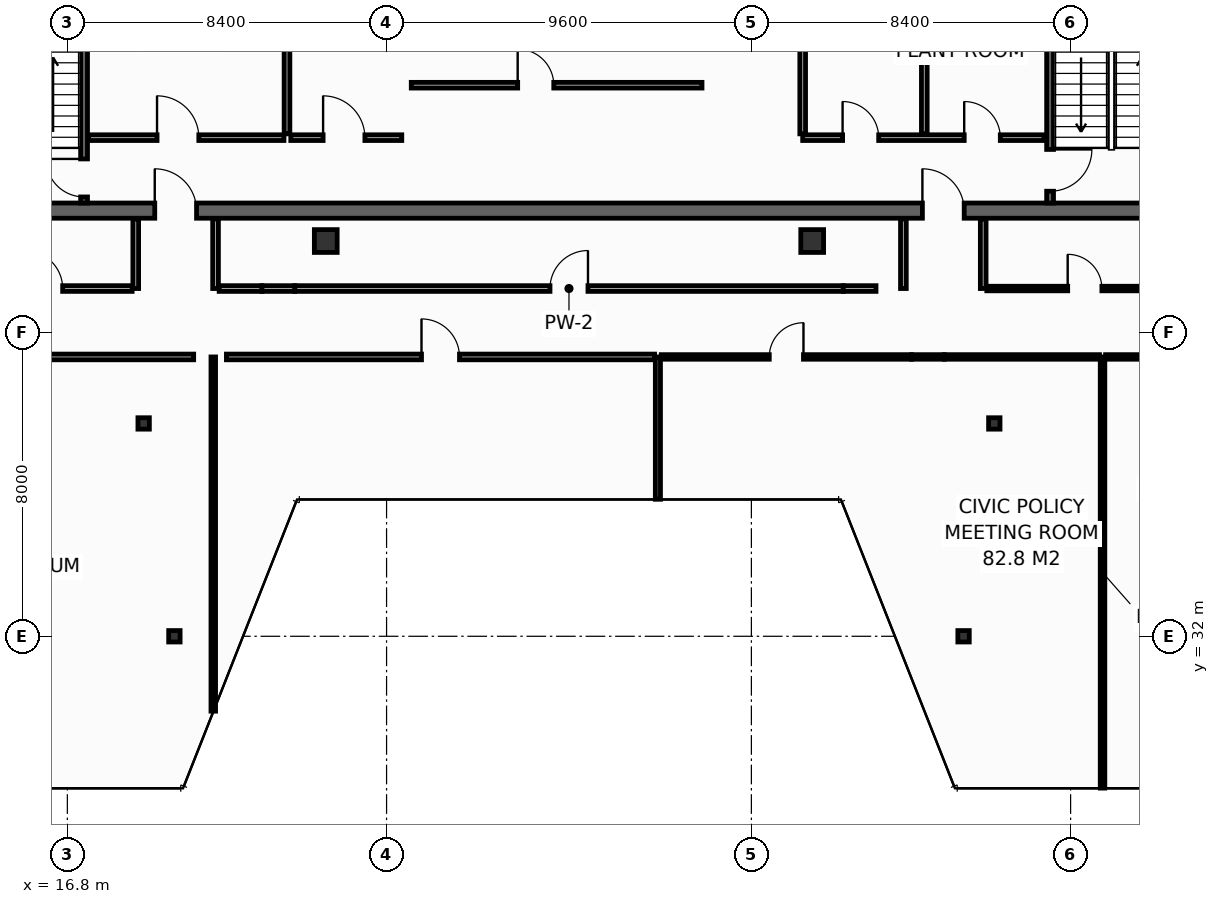
"""IFC4 building model, lengths in metres.
Left out: names, types, materials, properties, quantities, classifications, styles, units other than length and angle.
Written with IfcOpenShell. Run it as: python <this file> out.ifc"""

import sys

from ifc_helpers import new_model, si_unit, direction, frame, frame_2d, origin, origin_2d, place, context, subcontext, project, spatial, rectangle, hollow_rectangle, extrude, element, fill, save


model = new_model("IFC4")
c1 = context("Model", 3, precision=1e-05, world=origin(), true_north=direction((0.0, 1.0)))
c2 = subcontext(c1, "Body", "Model", "MODEL_VIEW")
j1 = project(units=[si_unit("LENGTHUNIT", "METRE"), si_unit("PLANEANGLEUNIT", "RADIAN")], contexts=[c1])
p1 = place(None, origin())
s1 = spatial("IfcSite", under=j1, at=p1, CompositionType="ELEMENT")
p2 = place(p1, origin())
s2 = spatial("IfcBuilding", under=s1, at=p2, CompositionType="ELEMENT")
p3 = place(p2, frame((0.0, 0.0, 291.4)))
s3 = spatial("IfcBuildingStorey", under=s2, at=p3, CompositionType="ELEMENT", Elevation=291.4)
p4 = place(p3, frame((13.7, 43.2, 0.0), z_axis=(0.0, 0.0, 1.0), x_axis=(1.0, 0.0, 0.0)))
e1 = element("IfcWall", 1, at=p4, inside=s3, PredefinedType="SHEAR", context=c2, shape_type="SweptSolid", body=[
    extrude(rectangle(XDim=32.5, YDim=0.4, at=frame_2d((16.25, 0.0))), origin(), (0.0, 0.0, 1.0), 3.55),
])
p5 = place(p4, frame((5.4, 0.0, 0.0)))
e2 = element("IfcOpeningElement", 2, at=p5, cuts=e1, PredefinedType="OPENING", context=c2, shape_type="SweptSolid", body=[
    extrude(rectangle(XDim=1.1, YDim=2.15, at=frame_2d((0.55, 1.075))), frame((0.0, 0.21, 0.0), z_axis=(0.0, -1.0, 0.0), x_axis=(1.0, 0.0, 0.0)), (0.0, 0.0, 1.0), 0.42),
])
p6 = place(p4, frame((25.6, 0.0, 0.0)))
e3 = element("IfcOpeningElement", 3, at=p6, cuts=e1, PredefinedType="OPENING", context=c2, shape_type="SweptSolid", body=[
    extrude(rectangle(XDim=1.1, YDim=2.15, at=frame_2d((0.55, 1.075))), frame((0.0, 0.21, 0.0), z_axis=(0.0, -1.0, 0.0), x_axis=(1.0, 0.0, 0.0)), (0.0, 0.0, 1.0), 0.42),
])
for number, where, z_axis, x_axis in (
    (4, (23.6, 42.4, 0.0), (0.0, 0.0, 1.0), (1.0, 0.0, 0.0)),
    (5, (36.4, 42.4, 0.0), (0.0, 0.0, 1.0), (1.0, 0.0, 0.0)),
):
    element("IfcColumn", number, at=place(p3, frame(where, z_axis=z_axis, x_axis=x_axis)), inside=s3, PredefinedType="COLUMN", context=c2, shape_type="SweptSolid", body=[
        extrude(hollow_rectangle(XDim=0.6, YDim=0.6, WallThickness=0.028, at=origin_2d()), origin(), (0.0, 0.0, 1.0), 3.8),
    ])
for number, where, z_axis, x_axis in (
    (6, (19.617, 32.0, 0.0), (0.0, 0.0, 1.0), (1.0, 0.0, 0.0)),
    (7, (40.383, 32.0, 0.0), (0.0, 0.0, 1.0), (1.0, 0.0, 0.0)),
    (8, (18.808, 37.6, 0.0), (0.0, 0.0, 1.0), (1.0, 0.0, 0.0)),
    (9, (41.192, 37.6, 0.0), (0.0, 0.0, 1.0), (1.0, 0.0, 0.0)),
):
    element("IfcColumn", number, at=place(p3, frame(where, z_axis=z_axis, x_axis=x_axis)), inside=s3, PredefinedType="COLUMN", context=c2, shape_type="SweptSolid", body=[
        extrude(hollow_rectangle(XDim=0.3, YDim=0.3, WallThickness=0.012, at=origin_2d()), origin(), (0.0, 0.0, 1.0), 3.8),
    ])
p7 = place(p3, frame((17.24, 43.4, 0.0), z_axis=(0.0, 0.0, 1.0), x_axis=(0.0, 1.0, 0.0)))
e10 = element("IfcWall", 10, at=p7, inside=s3, PredefinedType="SHEAR", context=c2, shape_type="SweptSolid", body=[
    extrude(rectangle(XDim=10.4, YDim=0.18, at=frame_2d((5.2, 0.0))), origin(), (0.0, 0.0, 1.0), 3.55),
])
p8 = place(p7, frame((0.16, 0.0, 0.0)))
e11 = element("IfcOpeningElement", 11, at=p8, cuts=e10, PredefinedType="OPENING", context=c2, shape_type="SweptSolid", body=[
    extrude(rectangle(XDim=1.0, YDim=2.15, at=frame_2d((0.5, 1.075))), frame((0.0, 0.1, 0.0), z_axis=(0.0, -1.0, 0.0), x_axis=(1.0, 0.0, 0.0)), (0.0, 0.0, 1.0), 0.2),
])
p9 = place(p3, frame((42.66, 53.8, 0.0), z_axis=(0.0, 0.0, 1.0), x_axis=(0.0, -1.0, 0.0)))
e12 = element("IfcWall", 12, at=p9, inside=s3, PredefinedType="SHEAR", context=c2, shape_type="SweptSolid", body=[
    extrude(rectangle(XDim=10.4, YDim=0.18, at=frame_2d((5.2, 0.0))), origin(), (0.0, 0.0, 1.0), 3.55),
])
p10 = place(p9, frame((8.99, 0.0, 0.0)))
e13 = element("IfcOpeningElement", 13, at=p10, cuts=e12, PredefinedType="OPENING", context=c2, shape_type="SweptSolid", body=[
    extrude(rectangle(XDim=1.1, YDim=2.15, at=frame_2d((0.55, 1.075))), frame((0.0, 0.1, 0.0), z_axis=(0.0, -1.0, 0.0), x_axis=(1.0, 0.0, 0.0)), (0.0, 0.0, 1.0), 0.2),
])
p11 = place(p3, frame((17.36, 45.12, 0.0), z_axis=(0.0, 0.0, 1.0), x_axis=(1.0, 0.0, 0.0)))
e14 = element("IfcWall", 14, at=p11, inside=s3, PredefinedType="PARTITIONING", context=c2, shape_type="SweptSolid", body=[
    extrude(rectangle(XDim=5.14, YDim=0.15, at=frame_2d((2.57, 0.0))), origin(), (0.0, 0.0, 1.0), 3.55),
])
p12 = place(p11, frame((1.8, 0.0, 0.0)))
e15 = element("IfcOpeningElement", 15, at=p12, cuts=e14, PredefinedType="OPENING", context=c2, shape_type="SweptSolid", body=[
    extrude(rectangle(XDim=1.1, YDim=2.15, at=frame_2d((0.55, 1.075))), frame((0.0, 0.085, 0.0), z_axis=(0.0, -1.0, 0.0), x_axis=(1.0, 0.0, 0.0)), (0.0, 0.0, 1.0), 0.17),
])
p13 = place(p3, frame((22.58, 50.55, 0.0), z_axis=(0.0, 0.0, 1.0), x_axis=(0.0, -1.0, 0.0)))
e16 = element("IfcWall", 16, at=p13, inside=s3, PredefinedType="PARTITIONING", context=c2, shape_type="SweptSolid", body=[
    extrude(rectangle(XDim=5.33, YDim=0.15, at=frame_2d((2.665, 0.0))), origin(), (0.0, 0.0, 1.0), 3.55),
])
p14 = place(p13, frame((1.8, 0.0, 0.0)))
e17 = element("IfcOpeningElement", 17, at=p14, cuts=e16, PredefinedType="OPENING", context=c2, shape_type="SweptSolid", body=[
    extrude(rectangle(XDim=1.1, YDim=2.15, at=frame_2d((0.55, 1.075))), frame((0.0, 0.085, 0.0), z_axis=(0.0, -1.0, 0.0), x_axis=(1.0, 0.0, 0.0)), (0.0, 0.0, 1.0), 0.17),
])
p15 = place(p3, frame((22.68, 45.12, 0.0), z_axis=(0.0, 0.0, 1.0), x_axis=(1.0, 0.0, 0.0)))
e18 = element("IfcWall", 18, at=p15, inside=s3, PredefinedType="PARTITIONING", context=c2, shape_type="SweptSolid", body=[
    extrude(rectangle(XDim=2.92, YDim=0.15, at=frame_2d((1.46, 0.0))), origin(), (0.0, 0.0, 1.0), 3.55),
])
p16 = place(p15, frame((0.85, 0.0, 0.0)))
e19 = element("IfcOpeningElement", 19, at=p16, cuts=e18, PredefinedType="OPENING", context=c2, shape_type="SweptSolid", body=[
    extrude(rectangle(XDim=1.1, YDim=2.15, at=frame_2d((0.55, 1.075))), frame((0.0, 0.085, 0.0), z_axis=(0.0, -1.0, 0.0), x_axis=(1.0, 0.0, 0.0)), (0.0, 0.0, 1.0), 0.17),
])
p17 = place(p3, frame((36.15, 45.12, 0.0), z_axis=(0.0, 0.0, 1.0), x_axis=(1.0, 0.0, 0.0)))
e20 = element("IfcWall", 20, at=p17, inside=s3, PredefinedType="PARTITIONING", context=c2, shape_type="SweptSolid", body=[
    extrude(rectangle(XDim=6.35, YDim=0.15, at=frame_2d((3.175, 0.0))), origin(), (0.0, 0.0, 1.0), 3.55),
])
p18 = place(p17, frame((1.05, 0.0, 0.0)))
e21 = element("IfcOpeningElement", 21, at=p18, cuts=e20, PredefinedType="OPENING", context=c2, shape_type="SweptSolid", body=[
    extrude(rectangle(XDim=0.95, YDim=2.15, at=frame_2d((0.475, 1.075))), frame((0.0, 0.085, 0.0), z_axis=(0.0, -1.0, 0.0), x_axis=(1.0, 0.0, 0.0)), (0.0, 0.0, 1.0), 0.17),
])
p19 = place(p17, frame((4.25, 0.0, 0.0)))
e22 = element("IfcOpeningElement", 22, at=p19, cuts=e20, PredefinedType="OPENING", context=c2, shape_type="SweptSolid", body=[
    extrude(rectangle(XDim=0.95, YDim=2.15, at=frame_2d((0.475, 1.075))), frame((0.0, 0.085, 0.0), z_axis=(0.0, -1.0, 0.0), x_axis=(1.0, 0.0, 0.0)), (0.0, 0.0, 1.0), 0.17),
])
for number, where, z_axis, x_axis in (
    (23, (36.15, 45.22, 0.0), (0.0, 0.0, 1.0), (0.0, 1.0, 0.0)),
    (24, (39.35, 45.22, 0.0), (0.0, 0.0, 1.0), (0.0, 1.0, 0.0)),
):
    element("IfcWall", number, at=place(p3, frame(where, z_axis=z_axis, x_axis=x_axis)), inside=s3, PredefinedType="PARTITIONING", context=c2, shape_type="SweptSolid", body=[
        extrude(rectangle(XDim=2.63, YDim=0.15, at=frame_2d((1.315, 0.0))), origin(), (0.0, 0.0, 1.0), 3.55),
    ])
p20 = place(p3, frame((25.85, 46.5, 0.0), z_axis=(0.0, 0.0, 1.0), x_axis=(1.0, 0.0, 0.0)))
e25 = element("IfcWall", 25, at=p20, inside=s3, PredefinedType="PARTITIONING", context=c2, shape_type="SweptSolid", body=[
    extrude(rectangle(XDim=7.65, YDim=0.15, at=frame_2d((3.825, 0.0))), origin(), (0.0, 0.0, 1.0), 3.55),
])
p21 = place(p20, frame((2.8, 0.0, 0.0)))
e26 = element("IfcOpeningElement", 26, at=p21, cuts=e25, PredefinedType="OPENING", context=c2, shape_type="SweptSolid", body=[
    extrude(rectangle(XDim=0.95, YDim=2.15, at=frame_2d((0.475, 1.075))), frame((0.0, 0.085, 0.0), z_axis=(0.0, -1.0, 0.0), x_axis=(1.0, 0.0, 0.0)), (0.0, 0.0, 1.0), 0.17),
])
for number, where, z_axis, x_axis in (
    (27, (18.6, 41.15, 0.0), (0.0, 0.0, 1.0), (0.0, 1.0, 0.0)),
    (28, (20.7, 41.15, 0.0), (0.0, 0.0, 1.0), (0.0, 1.0, 0.0)),
    (29, (38.8, 41.15, 0.0), (0.0, 0.0, 1.0), (0.0, 1.0, 0.0)),
    (30, (40.9, 41.15, 0.0), (0.0, 0.0, 1.0), (0.0, 1.0, 0.0)),
):
    element("IfcWall", number, at=place(p3, frame(where, z_axis=z_axis, x_axis=x_axis)), inside=s3, PredefinedType="PARTITIONING", context=c2, shape_type="SweptSolid", body=[
        extrude(rectangle(XDim=1.83, YDim=0.15, at=frame_2d((0.915, 0.0))), origin(), (0.0, 0.0, 1.0), 3.55),
    ])
p22 = place(p3, frame((13.85, 41.15, 0.0), z_axis=(0.0, 0.0, 1.0), x_axis=(1.0, 0.0, 0.0)))
e31 = element("IfcWall", 31, at=p22, inside=s3, PredefinedType="PARTITIONING", context=c2, shape_type="SweptSolid", body=[
    extrude(rectangle(XDim=4.655, YDim=0.15, at=frame_2d((2.327, 0.0))), origin(), (0.0, 0.0, 1.0), 3.55),
])
p23 = place(p22, frame((1.827, 0.0, 0.0)))
e32 = element("IfcOpeningElement", 32, at=p23, cuts=e31, PredefinedType="OPENING", context=c2, shape_type="SweptSolid", body=[
    extrude(rectangle(XDim=1.0, YDim=2.15, at=frame_2d((0.5, 1.075))), frame((0.0, 0.085, 0.0), z_axis=(0.0, -1.0, 0.0), x_axis=(1.0, 0.0, 0.0)), (0.0, 0.0, 1.0), 0.17),
])
p24 = place(p3, frame((22.783, 41.15, 0.0), z_axis=(0.0, 0.0, 1.0), x_axis=(1.0, 0.0, 0.0)))
e33 = element("IfcWall", 33, at=p24, inside=s3, PredefinedType="PARTITIONING", context=c2, shape_type="SweptSolid", body=[
    extrude(rectangle(XDim=14.434, YDim=0.15, at=frame_2d((7.217, 0.0))), origin(), (0.0, 0.0, 1.0), 3.55),
])
p25 = place(p24, frame((6.717, 0.0, 0.0)))
e34 = element("IfcOpeningElement", 34, at=p25, cuts=e33, PredefinedType="OPENING", context=c2, shape_type="SweptSolid", body=[
    extrude(rectangle(XDim=1.0, YDim=2.15, at=frame_2d((0.5, 1.075))), frame((0.0, 0.085, 0.0), z_axis=(0.0, -1.0, 0.0), x_axis=(1.0, 0.0, 0.0)), (0.0, 0.0, 1.0), 0.17),
])
p26 = place(p3, frame((20.795, 41.15, 0.0), z_axis=(0.0, 0.0, 1.0), x_axis=(1.0, 0.0, 0.0)))
e35 = element("IfcWall", 35, at=p26, inside=s3, PredefinedType="PARTITIONING", context=c2, shape_type="SweptSolid", body=[
    extrude(rectangle(XDim=1.126, YDim=0.15, at=frame_2d((0.563, 0.0))), origin(), (0.0, 0.0, 1.0), 3.55),
])
for number, where, z_axis, x_axis in (
    (36, (21.921, 41.15, 0.0), (0.0, 0.0, 1.0), (1.0, 0.0, 0.0)),
    (37, (37.217, 41.15, 0.0), (0.0, 0.0, 1.0), (1.0, 0.0, 0.0)),
):
    element("IfcWall", number, at=place(p3, frame(where, z_axis=z_axis, x_axis=x_axis)), inside=s3, PredefinedType="PARTITIONING", context=c2, shape_type="SweptSolid", body=[
        extrude(rectangle(XDim=0.862, YDim=0.15, at=frame_2d((0.431, 0.0))), origin(), (0.0, 0.0, 1.0), 2.135),
    ])
p27 = place(p3, frame((40.995, 41.15, 0.0), z_axis=(0.0, 0.0, 1.0), x_axis=(1.0, 0.0, 0.0)))
e38 = element("IfcWall", 38, at=p27, inside=s3, PredefinedType="PARTITIONING", context=c2, shape_type="SweptSolid", body=[
    extrude(rectangle(XDim=5.155, YDim=0.12, at=frame_2d((2.577, 0.0))), origin(), (0.0, 0.0, 1.0), 3.55),
])
p28 = place(p27, frame((2.128, 0.0, 0.0)))
e39 = element("IfcOpeningElement", 39, at=p28, cuts=e38, PredefinedType="OPENING", context=c2, shape_type="SweptSolid", body=[
    extrude(rectangle(XDim=0.9, YDim=2.1, at=frame_2d((0.45, 1.05))), frame((0.0, 0.07, 0.0), z_axis=(0.0, -1.0, 0.0), x_axis=(1.0, 0.0, 0.0)), (0.0, 0.0, 1.0), 0.14),
])
p29 = place(p3, frame((20.64, 30.029, 0.0), z_axis=(0.0, 0.0, 1.0), x_axis=(0.0, 1.0, 0.0)))
e40 = element("IfcWall", 40, at=p29, inside=s3, PredefinedType="PARTITIONING", context=c2, shape_type="SweptSolid", body=[
    extrude(rectangle(XDim=9.321, YDim=0.12, at=frame_2d((4.661, 0.0))), origin(), (0.0, 0.0, 1.0), 2.135),
])
p30 = place(p3, frame((32.34, 35.605, 0.0), z_axis=(0.0, 0.0, 1.0), x_axis=(0.0, 1.0, 0.0)))
e41 = element("IfcWall", 41, at=p30, inside=s3, PredefinedType="PARTITIONING", context=c2, shape_type="SweptSolid", body=[
    extrude(rectangle(XDim=3.745, YDim=0.135, at=frame_2d((1.873, 0.0))), origin(), (0.0, 0.0, 1.0), 2.135),
])
p31 = place(p3, frame((44.04, 28.005, 0.0), z_axis=(0.0, 0.0, 1.0), x_axis=(0.0, 1.0, 0.0)))
e42 = element("IfcWall", 42, at=p31, inside=s3, PredefinedType="PARTITIONING", context=c2, shape_type="SweptSolid", body=[
    extrude(rectangle(XDim=11.345, YDim=0.12, at=frame_2d((5.673, 0.0))), origin(), (0.0, 0.0, 1.0), 1.735),
])
p32 = place(p3, frame((6.523, 39.35, 0.0), z_axis=(0.0, 0.0, 1.0), x_axis=(1.0, 0.0, 0.0)))
e43 = element("IfcWall", 43, at=p32, inside=s3, PredefinedType="PARTITIONING", context=c2, shape_type="SweptSolid", body=[
    extrude(rectangle(XDim=13.601, YDim=0.15, at=frame_2d((6.8, 0.0))), origin(), (0.0, 0.0, 1.0), 3.085),
])
p33 = place(p32, frame((6.3, 0.0, 0.0)))
e44 = element("IfcOpeningElement", 44, at=p33, cuts=e43, PredefinedType="OPENING", context=c2, shape_type="SweptSolid", body=[
    extrude(rectangle(XDim=1.0, YDim=2.15, at=frame_2d((0.5, 1.075))), frame((0.0, 0.085, 0.0), z_axis=(0.0, -1.0, 0.0), x_axis=(1.0, 0.0, 0.0)), (0.0, 0.0, 1.0), 0.17),
])
p34 = place(p3, frame((20.986, 39.35, 0.0), z_axis=(0.0, 0.0, 1.0), x_axis=(1.0, 0.0, 0.0)))
e45 = element("IfcWall", 45, at=p34, inside=s3, PredefinedType="PARTITIONING", context=c2, shape_type="SweptSolid", body=[
    extrude(rectangle(XDim=11.266, YDim=0.15, at=frame_2d((5.633, 0.0))), origin(), (0.0, 0.0, 1.0), 3.55),
])
p35 = place(p34, frame((5.133, 0.0, 0.0)))
e46 = element("IfcOpeningElement", 46, at=p35, cuts=e45, PredefinedType="OPENING", context=c2, shape_type="SweptSolid", body=[
    extrude(rectangle(XDim=1.0, YDim=2.15, at=frame_2d((0.5, 1.075))), frame((0.0, 0.085, 0.0), z_axis=(0.0, -1.0, 0.0), x_axis=(1.0, 0.0, 0.0)), (0.0, 0.0, 1.0), 0.17),
])
p36 = place(p3, frame((32.427, 39.35, 0.0), z_axis=(0.0, 0.0, 1.0), x_axis=(1.0, 0.0, 0.0)))
e47 = element("IfcWall", 47, at=p36, inside=s3, PredefinedType="PARTITIONING", context=c2, shape_type="SweptSolid", body=[
    extrude(rectangle(XDim=6.586, YDim=0.12, at=frame_2d((3.293, 0.0))), origin(), (0.0, 0.0, 1.0), 3.55),
])
p37 = place(p36, frame((2.843, 0.0, 0.0)))
e48 = element("IfcOpeningElement", 48, at=p37, cuts=e47, PredefinedType="OPENING", context=c2, shape_type="SweptSolid", body=[
    extrude(rectangle(XDim=0.9, YDim=2.1, at=frame_2d((0.45, 1.05))), frame((0.0, 0.07, 0.0), z_axis=(0.0, -1.0, 0.0), x_axis=(1.0, 0.0, 0.0)), (0.0, 0.0, 1.0), 0.14),
])
p38 = place(p3, frame((39.876, 39.35, 0.0), z_axis=(0.0, 0.0, 1.0), x_axis=(1.0, 0.0, 0.0)))
e49 = element("IfcWall", 49, at=p38, inside=s3, PredefinedType="PARTITIONING", context=c2, shape_type="SweptSolid", body=[
    extrude(rectangle(XDim=4.084, YDim=0.12, at=frame_2d((2.042, 0.0))), origin(), (0.0, 0.0, 1.0), 3.55),
])
p39 = place(p3, frame((39.014, 39.35, 0.0), z_axis=(0.0, 0.0, 1.0), x_axis=(1.0, 0.0, 0.0)))
e50 = element("IfcWall", 50, at=p39, inside=s3, PredefinedType="PARTITIONING", context=c2, shape_type="SweptSolid", body=[
    extrude(rectangle(XDim=0.862, YDim=0.12, at=frame_2d((0.431, 0.0))), origin(), (0.0, 0.0, 1.0), 2.135),
])
p40 = place(p3, frame((44.12, 39.35, 0.0), z_axis=(0.0, 0.0, 1.0), x_axis=(1.0, 0.0, 0.0)))
e51 = element("IfcWall", 51, at=p40, inside=s3, PredefinedType="PARTITIONING", context=c2, shape_type="SweptSolid", body=[
    extrude(rectangle(XDim=9.356, YDim=0.12, at=frame_2d((4.678, 0.0))), origin(), (0.0, 0.0, 1.0), 3.085),
])
p41 = place(p40, frame((4.228, 0.0, 0.0)))
e52 = element("IfcOpeningElement", 52, at=p41, cuts=e51, PredefinedType="OPENING", context=c2, shape_type="SweptSolid", body=[
    extrude(rectangle(XDim=0.9, YDim=2.1, at=frame_2d((0.45, 1.05))), frame((0.0, 0.07, 0.0), z_axis=(0.0, -1.0, 0.0), x_axis=(1.0, 0.0, 0.0)), (0.0, 0.0, 1.0), 0.14),
])
p42 = place(p8, origin())
e53 = element("IfcDoor", 53, at=p42, inside=s3, OperationType="SINGLE_SWING_RIGHT", PredefinedType="DOOR", context=c2, shape_type="SweptSolid", body=[
    extrude(rectangle(XDim=1.0, YDim=2.15, at=frame_2d((0.5, 1.075))), frame((0.0, 0.025, 0.0), z_axis=(0.0, -1.0, 0.0), x_axis=(1.0, 0.0, 0.0)), (0.0, 0.0, 1.0), 0.05),
])
fill(e11, e53)
p43 = place(p10, origin())
e54 = element("IfcDoor", 54, at=p43, inside=s3, OperationType="SINGLE_SWING_LEFT", PredefinedType="DOOR", context=c2, shape_type="SweptSolid", body=[
    extrude(rectangle(XDim=1.1, YDim=2.15, at=frame_2d((0.55, 1.075))), frame((0.0, 0.025, 0.0), z_axis=(0.0, -1.0, 0.0), x_axis=(1.0, 0.0, 0.0)), (0.0, 0.0, 1.0), 0.05),
])
fill(e13, e54)
p44 = place(p12, origin())
e55 = element("IfcDoor", 55, at=p44, inside=s3, OperationType="SINGLE_SWING_LEFT", PredefinedType="DOOR", context=c2, shape_type="SweptSolid", body=[
    extrude(rectangle(XDim=1.1, YDim=2.15, at=frame_2d((0.55, 1.075))), frame((0.0, 0.025, 0.0), z_axis=(0.0, -1.0, 0.0), x_axis=(1.0, 0.0, 0.0)), (0.0, 0.0, 1.0), 0.05),
])
fill(e15, e55)
p45 = place(p16, origin())
e56 = element("IfcDoor", 56, at=p45, inside=s3, OperationType="SINGLE_SWING_LEFT", PredefinedType="DOOR", context=c2, shape_type="SweptSolid", body=[
    extrude(rectangle(XDim=1.1, YDim=2.15, at=frame_2d((0.55, 1.075))), frame((0.0, 0.025, 0.0), z_axis=(0.0, -1.0, 0.0), x_axis=(1.0, 0.0, 0.0)), (0.0, 0.0, 1.0), 0.05),
])
fill(e19, e56)
p46 = place(p5, origin())
e57 = element("IfcDoor", 57, at=p46, inside=s3, OperationType="SINGLE_SWING_LEFT", PredefinedType="DOOR", context=c2, shape_type="SweptSolid", body=[
    extrude(rectangle(XDim=1.1, YDim=2.15, at=frame_2d((0.55, 1.075))), frame((0.0, 0.025, 0.0), z_axis=(0.0, -1.0, 0.0), x_axis=(1.0, 0.0, 0.0)), (0.0, 0.0, 1.0), 0.05),
])
fill(e2, e57)
p47 = place(p6, origin())
e58 = element("IfcDoor", 58, at=p47, inside=s3, OperationType="SINGLE_SWING_LEFT", PredefinedType="DOOR", context=c2, shape_type="SweptSolid", body=[
    extrude(rectangle(XDim=1.1, YDim=2.15, at=frame_2d((0.55, 1.075))), frame((0.0, 0.025, 0.0), z_axis=(0.0, -1.0, 0.0), x_axis=(1.0, 0.0, 0.0)), (0.0, 0.0, 1.0), 0.05),
])
fill(e3, e58)
p48 = place(p18, origin())
e59 = element("IfcDoor", 59, at=p48, inside=s3, OperationType="SINGLE_SWING_LEFT", PredefinedType="DOOR", context=c2, shape_type="SweptSolid", body=[
    extrude(rectangle(XDim=0.95, YDim=2.15, at=frame_2d((0.475, 1.075))), frame((0.0, 0.025, 0.0), z_axis=(0.0, -1.0, 0.0), x_axis=(1.0, 0.0, 0.0)), (0.0, 0.0, 1.0), 0.05),
])
fill(e21, e59)
p49 = place(p19, origin())
e60 = element("IfcDoor", 60, at=p49, inside=s3, OperationType="SINGLE_SWING_LEFT", PredefinedType="DOOR", context=c2, shape_type="SweptSolid", body=[
    extrude(rectangle(XDim=0.95, YDim=2.15, at=frame_2d((0.475, 1.075))), frame((0.0, 0.025, 0.0), z_axis=(0.0, -1.0, 0.0), x_axis=(1.0, 0.0, 0.0)), (0.0, 0.0, 1.0), 0.05),
])
fill(e22, e60)
p50 = place(p21, origin())
e61 = element("IfcDoor", 61, at=p50, inside=s3, OperationType="SINGLE_SWING_LEFT", PredefinedType="DOOR", context=c2, shape_type="SweptSolid", body=[
    extrude(rectangle(XDim=0.95, YDim=2.15, at=frame_2d((0.475, 1.075))), frame((0.0, 0.025, 0.0), z_axis=(0.0, -1.0, 0.0), x_axis=(1.0, 0.0, 0.0)), (0.0, 0.0, 1.0), 0.05),
])
fill(e26, e61)
p51 = place(p23, origin())
e62 = element("IfcDoor", 62, at=p51, inside=s3, OperationType="SINGLE_SWING_LEFT", PredefinedType="DOOR", context=c2, shape_type="SweptSolid", body=[
    extrude(rectangle(XDim=1.0, YDim=2.15, at=frame_2d((0.5, 1.075))), frame((0.0, 0.025, 0.0), z_axis=(0.0, -1.0, 0.0), x_axis=(1.0, 0.0, 0.0)), (0.0, 0.0, 1.0), 0.05),
])
fill(e32, e62)
p52 = place(p25, origin())
e63 = element("IfcDoor", 63, at=p52, inside=s3, OperationType="SINGLE_SWING_RIGHT", PredefinedType="DOOR", context=c2, shape_type="SweptSolid", body=[
    extrude(rectangle(XDim=1.0, YDim=2.15, at=frame_2d((0.5, 1.075))), frame((0.0, 0.025, 0.0), z_axis=(0.0, -1.0, 0.0), x_axis=(1.0, 0.0, 0.0)), (0.0, 0.0, 1.0), 0.05),
])
fill(e34, e63)
p53 = place(p28, origin())
e64 = element("IfcDoor", 64, at=p53, inside=s3, OperationType="SINGLE_SWING_LEFT", PredefinedType="DOOR", context=c2, shape_type="SweptSolid", body=[
    extrude(rectangle(XDim=0.9, YDim=2.1, at=frame_2d((0.45, 1.05))), frame((0.0, 0.025, 0.0), z_axis=(0.0, -1.0, 0.0), x_axis=(1.0, 0.0, 0.0)), (0.0, 0.0, 1.0), 0.05),
])
fill(e39, e64)
p54 = place(p35, origin())
e65 = element("IfcDoor", 65, at=p54, inside=s3, OperationType="SINGLE_SWING_LEFT", PredefinedType="DOOR", context=c2, shape_type="SweptSolid", body=[
    extrude(rectangle(XDim=1.0, YDim=2.15, at=frame_2d((0.5, 1.075))), frame((0.0, 0.025, 0.0), z_axis=(0.0, -1.0, 0.0), x_axis=(1.0, 0.0, 0.0)), (0.0, 0.0, 1.0), 0.05),
])
fill(e46, e65)
p55 = place(p37, origin())
e66 = element("IfcDoor", 66, at=p55, inside=s3, OperationType="SINGLE_SWING_RIGHT", PredefinedType="DOOR", context=c2, shape_type="SweptSolid", body=[
    extrude(rectangle(XDim=0.9, YDim=2.1, at=frame_2d((0.45, 1.05))), frame((0.0, 0.025, 0.0), z_axis=(0.0, -1.0, 0.0), x_axis=(1.0, 0.0, 0.0)), (0.0, 0.0, 1.0), 0.05),
])
fill(e48, e66)
save(model, sys.argv[1])
